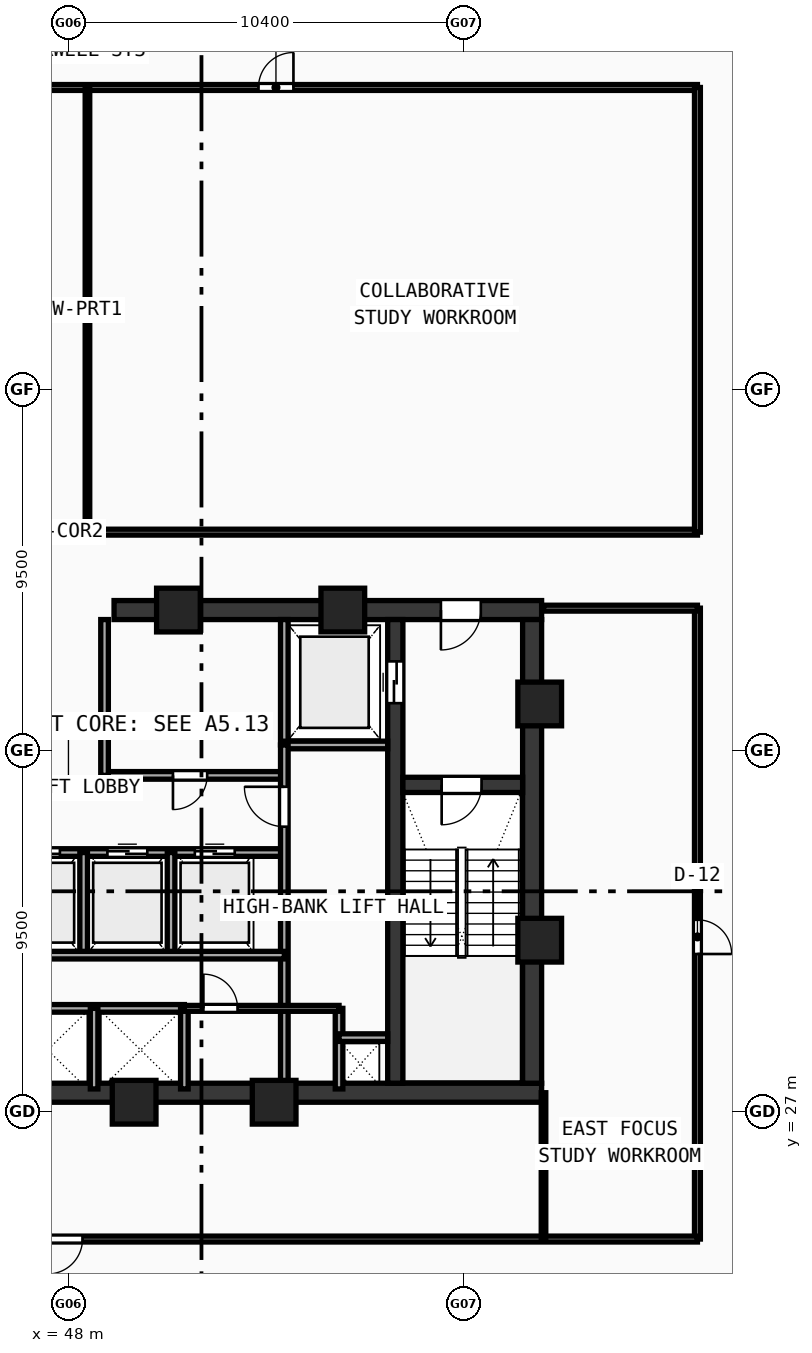
"""IFC4 building model, lengths in metres.
Left out: names, types, materials, properties, quantities, classifications, styles, units other than length and angle.
Written with IfcOpenShell. Run it as: python <this file> out.ifc"""

import sys

from ifc_helpers import new_model, si_unit, direction, frame, frame_2d, origin, origin_with_axes, origin_2d, place, context, subcontext, project, spatial, rectangle, hollow_rectangle, extrude, source, transform, mapped, element, fill, save


model = new_model("IFC4")
c1 = context("Model", 3, precision=1e-05, world=origin(), true_north=direction((0.0, 1.0)))
c2 = subcontext(c1, "Body", "Model", "MODEL_VIEW")
j1 = project(units=[si_unit("LENGTHUNIT", "METRE"), si_unit("PLANEANGLEUNIT", "RADIAN")], contexts=[c1])
p1 = place(None, origin())
s1 = spatial("IfcSite", under=j1, at=p1, CompositionType="ELEMENT")
p2 = place(p1, origin())
s2 = spatial("IfcBuilding", under=s1, at=p2, CompositionType="ELEMENT")
p3 = place(p2, frame((0.0, 0.0, 180.96)))
s3 = spatial("IfcBuildingStorey", under=s2, at=p3, CompositionType="ELEMENT", Elevation=180.96)
p4 = place(p3, frame((35.55, 27.5, 0.0), z_axis=(0.0, 0.0, 1.0), x_axis=(1.0, 0.0, 0.0)))
e1 = element("IfcWall", 1, at=p4, inside=s3, PredefinedType="SHEAR", context=c2, shape_type="SweptSolid", body=[
    extrude(rectangle(XDim=24.9, YDim=0.5, at=frame_2d((12.45, 0.0))), origin(), (0.0, 0.0, 1.0), 3.54),
])
p5 = place(p3, frame((49.2, 40.2, 0.0), z_axis=(0.0, 0.0, 1.0), x_axis=(1.0, 0.0, 0.0)))
e2 = element("IfcWall", 2, at=p5, inside=s3, PredefinedType="SHEAR", context=c2, shape_type="SweptSolid", body=[
    extrude(rectangle(XDim=11.25, YDim=0.5, at=frame_2d((5.625, 0.0))), origin(), (0.0, 0.0, 1.0), 3.54),
])
p6 = place(p5, frame((8.6, 0.0, 0.0)))
e3 = element("IfcOpeningElement", 3, at=p6, cuts=e2, PredefinedType="OPENING", context=c2, shape_type="SweptSolid", body=[
    extrude(rectangle(XDim=1.05, YDim=2.1, at=frame_2d((0.525, 1.05))), frame((0.0, 0.26, 0.0), z_axis=(0.0, -1.0, 0.0), x_axis=(1.0, 0.0, 0.0)), (0.0, 0.0, 1.0), 0.52),
])
p7 = place(p3, frame((60.2, 27.75, 0.0), z_axis=(0.0, 0.0, 1.0), x_axis=(0.0, 1.0, 0.0)))
e4 = element("IfcWall", 4, at=p7, inside=s3, PredefinedType="SHEAR", context=c2, shape_type="SweptSolid", body=[
    extrude(rectangle(XDim=12.2, YDim=0.5, at=frame_2d((6.1, 0.0))), origin(), (0.0, 0.0, 1.0), 3.54),
])
p8 = place(p3, frame((56.6, 27.75, 0.0), z_axis=(0.0, 0.0, 1.0), x_axis=(0.0, 1.0, 0.0)))
e5 = element("IfcWall", 5, at=p8, inside=s3, PredefinedType="SHEAR", context=c2, shape_type="SweptSolid", body=[
    extrude(rectangle(XDim=12.2, YDim=0.4, at=frame_2d((6.1, 0.0))), origin(), (0.0, 0.0, 1.0), 3.54),
])
p9 = place(p8, frame((10.0, 0.0, 0.0)))
e6 = element("IfcOpeningElement", 6, at=p9, cuts=e5, PredefinedType="OPENING", context=c2, shape_type="SweptSolid", body=[
    extrude(rectangle(XDim=1.1, YDim=2.1, at=frame_2d((0.55, 1.05))), frame((0.0, 0.21, 0.0), z_axis=(0.0, -1.0, 0.0), x_axis=(1.0, 0.0, 0.0)), (0.0, 0.0, 1.0), 0.42),
])
p10 = place(p3, frame((56.8, 35.6, 0.0), z_axis=(0.0, 0.0, 1.0), x_axis=(1.0, 0.0, 0.0)))
e7 = element("IfcWall", 7, at=p10, inside=s3, PredefinedType="SHEAR", context=c2, shape_type="SweptSolid", body=[
    extrude(rectangle(XDim=3.15, YDim=0.4, at=frame_2d((1.575, 0.0))), origin(), (0.0, 0.0, 1.0), 3.54),
])
p11 = place(p10, frame((1.02, 0.0, 0.0)))
e8 = element("IfcOpeningElement", 8, at=p11, cuts=e7, PredefinedType="OPENING", context=c2, shape_type="SweptSolid", body=[
    extrude(rectangle(XDim=1.05, YDim=2.1, at=frame_2d((0.525, 1.05))), frame((0.0, 0.21, 0.0), z_axis=(0.0, -1.0, 0.0), x_axis=(1.0, 0.0, 0.0)), (0.0, 0.0, 1.0), 0.42),
])
m1 = source(origin(), c2, "Body", "SweptSolid", [
    extrude(hollow_rectangle(XDim=1.15, YDim=1.15, WallThickness=0.048, at=origin_2d()), origin(), (0.0, 0.0, 1.0), 3.8),
])
for number, where, z_axis, x_axis in (
    (9, (49.729, 27.25, -0.26), (0.0, 0.0, 1.0), (1.0, 0.0, 0.0)),
    (10, (53.412, 27.25, -0.26), (0.0, 0.0, 1.0), (1.0, 0.0, 0.0)),
    (11, (60.4, 31.513, -0.26), (0.0, 0.0, 1.0), (1.0, 0.0, 0.0)),
    (12, (60.4, 37.729, -0.26), (0.0, 0.0, 1.0), (1.0, 0.0, 0.0)),
    (13, (55.219, 40.2, -0.26), (0.0, 0.0, 1.0), (1.0, 0.0, 0.0)),
    (14, (50.894, 40.2, -0.26), (0.0, 0.0, 1.0), (1.0, 0.0, 0.0)),
):
    element("IfcColumn", number, at=place(p3, frame(where, z_axis=z_axis, x_axis=x_axis)), inside=s3, PredefinedType="COLUMN", context=c2, shape_type="MappedRepresentation", body=[
        mapped(m1, transform((0.0, 0.0, 0.0), scale=1.0)),
    ])
p12 = place(p3, frame((53.68, 36.65, 0.0), z_axis=(0.0, 0.0, 1.0), x_axis=(0.0, 1.0, 0.0)))
e15 = element("IfcWall", 15, at=p12, inside=s3, PredefinedType="SOLIDWALL", context=c2, shape_type="SweptSolid", body=[
    extrude(rectangle(XDim=3.3, YDim=0.2, at=frame_2d((1.65, 0.0))), origin(), (0.0, 0.0, 1.0), 3.54),
])
p13 = place(p3, frame((53.68, 36.65, 0.0), z_axis=(0.0, 0.0, 1.0), x_axis=(1.0, 0.0, 0.0)))
e16 = element("IfcWall", 16, at=p13, inside=s3, PredefinedType="SOLIDWALL", context=c2, shape_type="SweptSolid", body=[
    extrude(rectangle(XDim=2.72, YDim=0.2, at=frame_2d((1.36, 0.0))), origin(), (0.0, 0.0, 1.0), 3.54),
])
p14 = place(p3, frame((48.95, 35.85, 0.0), z_axis=(0.0, 0.0, 1.0), x_axis=(1.0, 0.0, 0.0)))
e17 = element("IfcWall", 17, at=p14, inside=s3, PredefinedType="SOLIDWALL", context=c2, shape_type="SweptSolid", body=[
    extrude(rectangle(XDim=4.73, YDim=0.2, at=frame_2d((2.365, 0.0))), origin(), (0.0, 0.0, 1.0), 3.54),
])
p15 = place(p14, frame((1.8, 0.0, 0.0)))
e18 = element("IfcOpeningElement", 18, at=p15, cuts=e17, PredefinedType="OPENING", context=c2, shape_type="SweptSolid", body=[
    extrude(rectangle(XDim=0.9, YDim=2.1, at=frame_2d((0.45, 1.05))), frame((0.0, 0.11, 0.0), z_axis=(0.0, -1.0, 0.0), x_axis=(1.0, 0.0, 0.0)), (0.0, 0.0, 1.0), 0.22),
])
p16 = place(p3, frame((48.95, 35.85, 0.0), z_axis=(0.0, 0.0, 1.0), x_axis=(0.0, 1.0, 0.0)))
e19 = element("IfcWall", 19, at=p16, inside=s3, PredefinedType="SOLIDWALL", context=c2, shape_type="SweptSolid", body=[
    extrude(rectangle(XDim=4.1, YDim=0.2, at=frame_2d((2.05, 0.0))), origin(), (0.0, 0.0, 1.0), 3.54),
])
p17 = place(p3, frame((43.85, 33.82, 0.0), z_axis=(0.0, 0.0, 1.0), x_axis=(1.0, 0.0, 0.0)))
e20 = element("IfcWall", 20, at=p17, inside=s3, PredefinedType="SOLIDWALL", context=c2, shape_type="SweptSolid", body=[
    extrude(rectangle(XDim=9.83, YDim=0.2, at=frame_2d((4.915, 0.0))), origin(), (0.0, 0.0, 1.0), 3.54),
])
p18 = place(p17, frame((0.575, 0.0, 0.0)))
e21 = element("IfcOpeningElement", 21, at=p18, cuts=e20, PredefinedType="OPENING", context=c2, shape_type="SweptSolid", body=[
    extrude(rectangle(XDim=1.05, YDim=2.1, at=frame_2d((0.525, 1.05))), frame((0.0, 0.11, 0.0), z_axis=(0.0, -1.0, 0.0), x_axis=(1.0, 0.0, 0.0)), (0.0, 0.0, 1.0), 0.22),
])
p19 = place(p17, frame((2.875, 0.0, 0.0)))
e22 = element("IfcOpeningElement", 22, at=p19, cuts=e20, PredefinedType="OPENING", context=c2, shape_type="SweptSolid", body=[
    extrude(rectangle(XDim=1.05, YDim=2.1, at=frame_2d((0.525, 1.05))), frame((0.0, 0.11, 0.0), z_axis=(0.0, -1.0, 0.0), x_axis=(1.0, 0.0, 0.0)), (0.0, 0.0, 1.0), 0.22),
])
p20 = place(p17, frame((5.175, 0.0, 0.0)))
e23 = element("IfcOpeningElement", 23, at=p20, cuts=e20, PredefinedType="OPENING", context=c2, shape_type="SweptSolid", body=[
    extrude(rectangle(XDim=1.05, YDim=2.1, at=frame_2d((0.525, 1.05))), frame((0.0, 0.11, 0.0), z_axis=(0.0, -1.0, 0.0), x_axis=(1.0, 0.0, 0.0)), (0.0, 0.0, 1.0), 0.22),
])
p21 = place(p17, frame((7.475, 0.0, 0.0)))
e24 = element("IfcOpeningElement", 24, at=p21, cuts=e20, PredefinedType="OPENING", context=c2, shape_type="SweptSolid", body=[
    extrude(rectangle(XDim=1.05, YDim=2.1, at=frame_2d((0.525, 1.05))), frame((0.0, 0.11, 0.0), z_axis=(0.0, -1.0, 0.0), x_axis=(1.0, 0.0, 0.0)), (0.0, 0.0, 1.0), 0.22),
])
p22 = place(p3, frame((53.68, 27.6, 0.0), z_axis=(0.0, 0.0, 1.0), x_axis=(0.0, 1.0, 0.0)))
e25 = element("IfcWall", 25, at=p22, inside=s3, PredefinedType="SOLIDWALL", context=c2, shape_type="SweptSolid", body=[
    extrude(rectangle(XDim=9.05, YDim=0.2, at=frame_2d((4.525, 0.0))), origin(), (0.0, 0.0, 1.0), 3.54),
])
p23 = place(p22, frame((6.9, 0.0, 0.0)))
e26 = element("IfcOpeningElement", 26, at=p23, cuts=e25, PredefinedType="OPENING", context=c2, shape_type="SweptSolid", body=[
    extrude(rectangle(XDim=1.05, YDim=2.1, at=frame_2d((0.525, 1.05))), frame((0.0, 0.11, 0.0), z_axis=(0.0, -1.0, 0.0), x_axis=(1.0, 0.0, 0.0)), (0.0, 0.0, 1.0), 0.22),
])
for number, where, z_axis, x_axis in (
    (27, (48.4, 31.12, 0.0), (0.0, 0.0, 1.0), (0.0, 1.0, 0.0)),
    (28, (50.7, 31.12, 0.0), (0.0, 0.0, 1.0), (0.0, 1.0, 0.0)),
):
    element("IfcWall", number, at=place(p3, frame(where, z_axis=z_axis, x_axis=x_axis)), inside=s3, PredefinedType="SOLIDWALL", context=c2, shape_type="SweptSolid", body=[
        extrude(rectangle(XDim=2.7, YDim=0.2, at=frame_2d((1.35, 0.0))), origin(), (0.0, 0.0, 1.0), 3.54),
    ])
p24 = place(p3, frame((43.85, 29.72, 0.0), z_axis=(0.0, 0.0, 1.0), x_axis=(1.0, 0.0, 0.0)))
e29 = element("IfcWall", 29, at=p24, inside=s3, PredefinedType="SOLIDWALL", context=c2, shape_type="SweptSolid", body=[
    extrude(rectangle(XDim=7.2, YDim=0.2, at=frame_2d((3.6, 0.0))), origin(), (0.0, 0.0, 1.0), 3.54),
])
p25 = place(p3, frame((51.05, 27.6, 0.0), z_axis=(0.0, 0.0, 1.0), x_axis=(0.0, 1.0, 0.0)))
e30 = element("IfcWall", 30, at=p25, inside=s3, PredefinedType="SOLIDWALL", context=c2, shape_type="SweptSolid", body=[
    extrude(rectangle(XDim=2.12, YDim=0.2, at=frame_2d((1.06, 0.0))), origin(), (0.0, 0.0, 1.0), 3.54),
])
p26 = place(p3, frame((43.85, 31.12, 0.0), z_axis=(0.0, 0.0, 1.0), x_axis=(1.0, 0.0, 0.0)))
e31 = element("IfcWall", 31, at=p26, inside=s3, PredefinedType="SOLIDWALL", context=c2, shape_type="SweptSolid", body=[
    extrude(rectangle(XDim=9.83, YDim=0.2, at=frame_2d((4.915, 0.0))), origin(), (0.0, 0.0, 1.0), 3.54),
])
for number, where, z_axis, x_axis in (
    (32, (48.675, 27.6, 0.0), (0.0, 0.0, 1.0), (0.0, 1.0, 0.0)),
    (33, (55.12, 27.6, 0.0), (0.0, 0.0, 1.0), (0.0, 1.0, 0.0)),
):
    element("IfcWall", number, at=place(p3, frame(where, z_axis=z_axis, x_axis=x_axis)), inside=s3, PredefinedType="SOLIDWALL", context=c2, shape_type="SweptSolid", body=[
        extrude(rectangle(XDim=2.12, YDim=0.2, at=frame_2d((1.06, 0.0))), origin(), (0.0, 0.0, 1.0), 3.54),
    ])
p27 = place(p3, frame((55.12, 28.95, 0.0), z_axis=(0.0, 0.0, 1.0), x_axis=(1.0, 0.0, 0.0)))
e34 = element("IfcWall", 34, at=p27, inside=s3, PredefinedType="SOLIDWALL", context=c2, shape_type="SweptSolid", body=[
    extrude(rectangle(XDim=1.28, YDim=0.2, at=frame_2d((0.64, 0.0))), origin(), (0.0, 0.0, 1.0), 3.54),
])
p28 = place(p3, frame((51.05, 29.72, 0.0), z_axis=(0.0, 0.0, 1.0), x_axis=(1.0, 0.0, 0.0)))
e35 = element("IfcWall", 35, at=p28, inside=s3, PredefinedType="PARTITIONING", context=c2, shape_type="SweptSolid", body=[
    extrude(rectangle(XDim=4.07, YDim=0.155, at=frame_2d((2.035, 0.0))), origin(), (0.0, 0.0, 1.0), 3.54),
])
p29 = place(p28, frame((0.5, 0.0, 0.0)))
e36 = element("IfcOpeningElement", 36, at=p29, cuts=e35, PredefinedType="OPENING", context=c2, shape_type="SweptSolid", body=[
    extrude(rectangle(XDim=0.9, YDim=2.1, at=frame_2d((0.45, 1.05))), frame((0.0, 0.087, 0.0), z_axis=(0.0, -1.0, 0.0), x_axis=(1.0, 0.0, 0.0)), (0.0, 0.0, 1.0), 0.175),
])
p30 = place(p3, frame((31.45, 42.25, 0.0), z_axis=(0.0, 0.0, 1.0), x_axis=(1.0, 0.0, 0.0)))
e37 = element("IfcWall", 37, at=p30, inside=s3, PredefinedType="PARTITIONING", context=c2, shape_type="SweptSolid", body=[
    extrude(rectangle(XDim=33.1, YDim=0.155, at=frame_2d((16.55, 0.0))), origin(), (0.0, 0.0, 1.0), 2.89),
])
p31 = place(p3, frame((31.45, 53.95, 0.0), z_axis=(0.0, 0.0, 1.0), x_axis=(1.0, 0.0, 0.0)))
e38 = element("IfcWall", 38, at=p31, inside=s3, PredefinedType="PARTITIONING", context=c2, shape_type="SweptSolid", body=[
    extrude(rectangle(XDim=33.1, YDim=0.155, at=frame_2d((16.55, 0.0))), origin(), (0.0, 0.0, 1.0), 2.89),
])
p32 = place(p31, frame((8.0, 0.0, 0.0)))
e39 = element("IfcOpeningElement", 39, at=p32, cuts=e38, PredefinedType="OPENING", context=c2, shape_type="SweptSolid", body=[
    extrude(rectangle(XDim=0.92, YDim=2.1, at=frame_2d((0.46, 1.05))), frame((0.0, 0.087, 0.0), z_axis=(0.0, -1.0, 0.0), x_axis=(1.0, 0.0, 0.0)), (0.0, 0.0, 1.0), 0.175),
])
p33 = place(p31, frame((21.55, 0.0, 0.0)))
e40 = element("IfcOpeningElement", 40, at=p33, cuts=e38, PredefinedType="OPENING", context=c2, shape_type="SweptSolid", body=[
    extrude(rectangle(XDim=0.92, YDim=2.1, at=frame_2d((0.46, 1.05))), frame((0.0, 0.087, 0.0), z_axis=(0.0, -1.0, 0.0), x_axis=(1.0, 0.0, 0.0)), (0.0, 0.0, 1.0), 0.175),
])
p34 = place(p3, frame((64.55, 42.25, 0.0), z_axis=(0.0, 0.0, 1.0), x_axis=(0.0, 1.0, 0.0)))
e41 = element("IfcWall", 41, at=p34, inside=s3, PredefinedType="PARTITIONING", context=c2, shape_type="SweptSolid", body=[
    extrude(rectangle(XDim=11.7, YDim=0.155, at=frame_2d((5.85, 0.0))), origin(), (0.0, 0.0, 1.0), 2.89),
])
p35 = place(p3, frame((48.5, 42.25, 0.0), z_axis=(0.0, 0.0, 1.0), x_axis=(0.0, 1.0, 0.0)))
e42 = element("IfcWall", 42, at=p35, inside=s3, PredefinedType="PARTITIONING", context=c2, shape_type="SweptSolid", body=[
    extrude(rectangle(XDim=11.7, YDim=0.12, at=frame_2d((5.85, 0.0))), origin(), (0.0, 0.0, 1.0), 3.14),
])
p36 = place(p3, frame((64.55, 23.65, 0.0), z_axis=(0.0, 0.0, 1.0), x_axis=(0.0, 1.0, 0.0)))
e43 = element("IfcWall", 43, at=p36, inside=s3, PredefinedType="PARTITIONING", context=c2, shape_type="SweptSolid", body=[
    extrude(rectangle(XDim=16.6, YDim=0.155, at=frame_2d((8.3, 0.0))), origin(), (0.0, 0.0, 1.0), 2.89),
])
p37 = place(p36, frame((7.5, 0.0, 0.0)))
e44 = element("IfcOpeningElement", 44, at=p37, cuts=e43, PredefinedType="OPENING", context=c2, shape_type="SweptSolid", body=[
    extrude(rectangle(XDim=0.9, YDim=2.08, at=frame_2d((0.45, 1.04))), frame((0.0, 0.087, 0.0), z_axis=(0.0, -1.0, 0.0), x_axis=(1.0, 0.0, 0.0)), (0.0, 0.0, 1.0), 0.175),
])
p38 = place(p3, frame((31.45, 23.65, 0.0), z_axis=(0.0, 0.0, 1.0), x_axis=(1.0, 0.0, 0.0)))
e45 = element("IfcWall", 45, at=p38, inside=s3, PredefinedType="PARTITIONING", context=c2, shape_type="SweptSolid", body=[
    extrude(rectangle(XDim=33.1, YDim=0.155, at=frame_2d((16.55, 0.0))), origin(), (0.0, 0.0, 1.0), 2.89),
])
p39 = place(p38, frame((16.0, 0.0, 0.0)))
e46 = element("IfcOpeningElement", 46, at=p39, cuts=e45, PredefinedType="OPENING", context=c2, shape_type="SweptSolid", body=[
    extrude(rectangle(XDim=0.92, YDim=2.1, at=frame_2d((0.46, 1.05))), frame((0.0, 0.087, 0.0), z_axis=(0.0, -1.0, 0.0), x_axis=(1.0, 0.0, 0.0)), (0.0, 0.0, 1.0), 0.175),
])
p40 = place(p3, frame((60.5, 40.25, 0.0), z_axis=(0.0, 0.0, 1.0), x_axis=(1.0, 0.0, 0.0)))
e47 = element("IfcWall", 47, at=p40, inside=s3, PredefinedType="PARTITIONING", context=c2, shape_type="SweptSolid", body=[
    extrude(rectangle(XDim=4.05, YDim=0.155, at=frame_2d((2.025, 0.0))), origin(), (0.0, 0.0, 1.0), 3.54),
])
p41 = place(p3, frame((60.5, 23.65, 0.0), z_axis=(0.0, 0.0, 1.0), x_axis=(0.0, 1.0, 0.0)))
e48 = element("IfcWall", 48, at=p41, inside=s3, PredefinedType="PARTITIONING", context=c2, shape_type="SweptSolid", body=[
    extrude(rectangle(XDim=3.85, YDim=0.12, at=frame_2d((1.925, 0.0))), origin(), (0.0, 0.0, 1.0), 3.14),
])
m2 = source(origin(), c2, "Body", "SweptSolid", [
    extrude(rectangle(XDim=1.05, YDim=2.1, at=frame_2d((0.525, 1.05))), frame((0.0, 0.025, 0.0), z_axis=(0.0, -1.0, 0.0), x_axis=(1.0, 0.0, 0.0)), (0.0, 0.0, 1.0), 0.05),
])
p42 = place(p11, frame((1.05, 0.0, 0.0), z_axis=(0.0, 0.0, 1.0), x_axis=(-1.0, 0.0, 0.0)))
e49 = element("IfcDoor", 49, at=p42, inside=s3, OperationType="SINGLE_SWING_RIGHT", PredefinedType="DOOR", context=c2, shape_type="MappedRepresentation", body=[
    mapped(m2, transform((0.0, 0.0, 0.0), scale=1.0)),
])
fill(e8, e49)
p43 = place(p6, frame((1.05, 0.0, 0.0), z_axis=(0.0, 0.0, 1.0), x_axis=(-1.0, 0.0, 0.0)))
e50 = element("IfcDoor", 50, at=p43, inside=s3, OperationType="SINGLE_SWING_RIGHT", PredefinedType="DOOR", context=c2, shape_type="MappedRepresentation", body=[
    mapped(m2, transform((0.0, 0.0, 0.0), scale=1.0)),
])
fill(e3, e50)
m3 = source(origin(), c2, "Body", "SweptSolid", [
    extrude(rectangle(XDim=1.1, YDim=2.1, at=frame_2d((0.55, 1.05))), frame((0.0, 0.025, 0.0), z_axis=(0.0, -1.0, 0.0), x_axis=(1.0, 0.0, 0.0)), (0.0, 0.0, 1.0), 0.05),
])
p44 = place(p9, origin_with_axes())
e51 = element("IfcDoor", 51, at=p44, inside=s3, OperationType="DOUBLE_DOOR_SLIDING", PredefinedType="DOOR", context=c2, shape_type="MappedRepresentation", body=[
    mapped(m3, transform((0.0, 0.0, 0.0), scale=1.0)),
])
fill(e6, e51)
m4 = source(origin(), c2, "Body", "SweptSolid", [
    extrude(rectangle(XDim=0.9, YDim=2.1, at=frame_2d((0.45, 1.05))), frame((0.0, 0.025, 0.0), z_axis=(0.0, -1.0, 0.0), x_axis=(1.0, 0.0, 0.0)), (0.0, 0.0, 1.0), 0.05),
])
p45 = place(p15, frame((0.9, 0.0, 0.0), z_axis=(0.0, 0.0, 1.0), x_axis=(-1.0, 0.0, 0.0)))
e52 = element("IfcDoor", 52, at=p45, inside=s3, OperationType="SINGLE_SWING_RIGHT", PredefinedType="DOOR", context=c2, shape_type="MappedRepresentation", body=[
    mapped(m4, transform((0.0, 0.0, 0.0), scale=1.0)),
])
fill(e18, e52)
p46 = place(p19, origin_with_axes())
e53 = element("IfcDoor", 53, at=p46, inside=s3, OperationType="DOUBLE_DOOR_SLIDING", PredefinedType="DOOR", context=c2, shape_type="MappedRepresentation", body=[
    mapped(m2, transform((0.0, 0.0, 0.0), scale=1.0)),
])
fill(e22, e53)
p47 = place(p20, origin_with_axes())
e54 = element("IfcDoor", 54, at=p47, inside=s3, OperationType="DOUBLE_DOOR_SLIDING", PredefinedType="DOOR", context=c2, shape_type="MappedRepresentation", body=[
    mapped(m2, transform((0.0, 0.0, 0.0), scale=1.0)),
])
fill(e23, e54)
p48 = place(p21, origin_with_axes())
e55 = element("IfcDoor", 55, at=p48, inside=s3, OperationType="DOUBLE_DOOR_SLIDING", PredefinedType="DOOR", context=c2, shape_type="MappedRepresentation", body=[
    mapped(m2, transform((0.0, 0.0, 0.0), scale=1.0)),
])
fill(e24, e55)
p49 = place(p23, origin_with_axes())
e56 = element("IfcDoor", 56, at=p49, inside=s3, OperationType="SINGLE_SWING_RIGHT", PredefinedType="DOOR", context=c2, shape_type="MappedRepresentation", body=[
    mapped(m2, transform((0.0, 0.0, 0.0), scale=1.0)),
])
fill(e26, e56)
p50 = place(p29, origin_with_axes())
e57 = element("IfcDoor", 57, at=p50, inside=s3, OperationType="SINGLE_SWING_LEFT", PredefinedType="DOOR", context=c2, shape_type="MappedRepresentation", body=[
    mapped(m4, transform((0.0, 0.0, 0.0), scale=1.0)),
])
fill(e36, e57)
m5 = source(origin(), c2, "Body", "SweptSolid", [
    extrude(rectangle(XDim=0.92, YDim=2.1, at=frame_2d((0.46, 1.05))), frame((0.0, 0.025, 0.0), z_axis=(0.0, -1.0, 0.0), x_axis=(1.0, 0.0, 0.0)), (0.0, 0.0, 1.0), 0.05),
])
p51 = place(p33, origin_with_axes())
e58 = element("IfcDoor", 58, at=p51, inside=s3, OperationType="SINGLE_SWING_RIGHT", PredefinedType="DOOR", context=c2, shape_type="MappedRepresentation", body=[
    mapped(m5, transform((0.0, 0.0, 0.0), scale=1.0)),
])
fill(e40, e58)
p52 = place(p39, frame((0.92, 0.0, 0.0), z_axis=(0.0, 0.0, 1.0), x_axis=(-1.0, 0.0, 0.0)))
e59 = element("IfcDoor", 59, at=p52, inside=s3, OperationType="SINGLE_SWING_RIGHT", PredefinedType="DOOR", context=c2, shape_type="MappedRepresentation", body=[
    mapped(m5, transform((0.0, 0.0, 0.0), scale=1.0)),
])
fill(e46, e59)
m6 = source(origin(), c2, "Body", "SweptSolid", [
    extrude(rectangle(XDim=0.9, YDim=2.08, at=frame_2d((0.45, 1.04))), frame((0.0, 0.025, 0.0), z_axis=(0.0, -1.0, 0.0), x_axis=(1.0, 0.0, 0.0)), (0.0, 0.0, 1.0), 0.05),
])
p53 = place(p37, frame((0.9, 0.0, 0.0), z_axis=(0.0, 0.0, 1.0), x_axis=(-1.0, 0.0, 0.0)))
e60 = element("IfcDoor", 60, at=p53, inside=s3, OperationType="SINGLE_SWING_RIGHT", PredefinedType="DOOR", context=c2, shape_type="MappedRepresentation", body=[
    mapped(m6, transform((0.0, 0.0, 0.0), scale=1.0)),
])
fill(e44, e60)
save(model, sys.argv[1])
